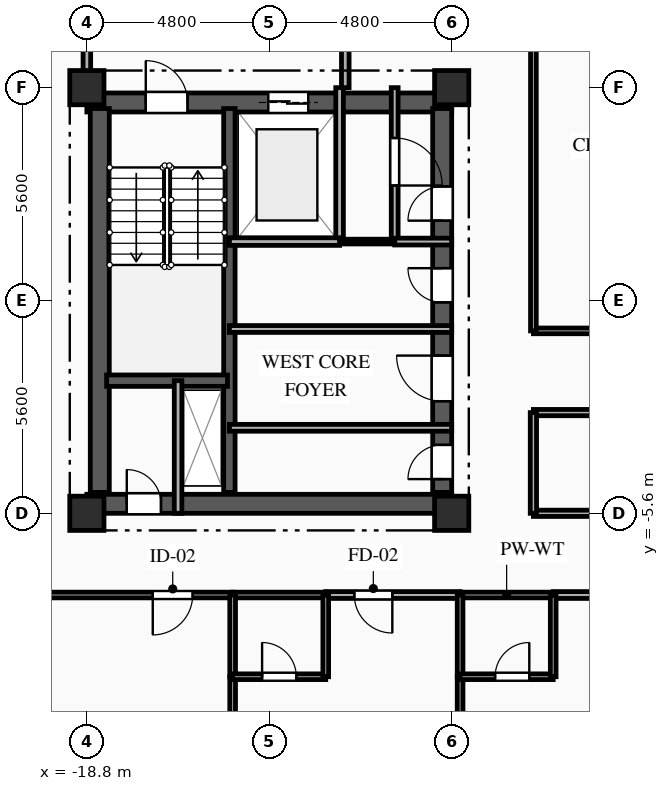
"""IFC4 building model, lengths in metres.
Left out: names, types, materials, properties, quantities, classifications, styles, units other than length and angle.
Written with IfcOpenShell. Run it as: python <this file> out.ifc"""

import sys

from ifc_helpers import new_model, si_unit, direction, frame, frame_2d, origin, origin_2d, place, context, subcontext, project, spatial, rectangle, extrude, element, fill, save


model = new_model("IFC4")
c1 = context("Model", 3, precision=1e-05, world=origin(), true_north=direction((0.0, 1.0)))
c2 = subcontext(c1, "Body", "Model", "MODEL_VIEW")
j1 = project(units=[si_unit("LENGTHUNIT", "METRE"), si_unit("PLANEANGLEUNIT", "RADIAN")], contexts=[c1])
p1 = place(None, origin())
s1 = spatial("IfcSite", under=j1, at=p1, CompositionType="ELEMENT")
p2 = place(p1, origin())
s2 = spatial("IfcBuilding", under=s1, at=p2, CompositionType="ELEMENT")
p3 = place(p2, frame((0.0, 0.0, 151.1)))
s3 = spatial("IfcBuildingStorey", under=s2, at=p3, CompositionType="ELEMENT", Elevation=151.1)
for number, where, z_axis, x_axis in (
    (1, (-18.8, -5.6, 0.0), (0.0, 0.0, 1.0), (1.0, 0.0, 0.0)),
    (2, (-18.8, 5.6, 0.0), (0.0, 0.0, 1.0), (1.0, 0.0, 0.0)),
    (3, (-9.2, -5.6, 0.0), (0.0, 0.0, 1.0), (1.0, 0.0, 0.0)),
    (4, (-9.2, 5.6, 0.0), (0.0, 0.0, 1.0), (1.0, 0.0, 0.0)),
):
    element("IfcColumn", number, at=place(p3, frame(where, z_axis=z_axis, x_axis=x_axis)), inside=s3, PredefinedType="COLUMN", context=c2, shape_type="SweptSolid", body=[
        extrude(rectangle(XDim=0.9, YDim=0.9, at=origin_2d()), origin(), (0.0, 0.0, 1.0), 3.35),
    ])
p4 = place(p3, frame((-18.8, 5.21, 0.0), z_axis=(0.0, 0.0, 1.0), x_axis=(1.0, 0.0, 0.0)))
e5 = element("IfcWall", 5, at=p4, inside=s3, PredefinedType="SHEAR", context=c2, shape_type="SweptSolid", body=[
    extrude(rectangle(XDim=9.6, YDim=0.5, at=frame_2d((4.8, 0.0))), origin(), (0.0, 0.0, 1.0), 3.04),
])
p5 = place(p4, frame((1.55, 0.0, 0.0)))
e6 = element("IfcOpeningElement", 6, at=p5, cuts=e5, PredefinedType="OPENING", context=c2, shape_type="SweptSolid", body=[
    extrude(rectangle(XDim=1.1, YDim=2.15, at=frame_2d((0.55, 1.075))), frame((0.0, 0.26, 0.0), z_axis=(0.0, -1.0, 0.0), x_axis=(1.0, 0.0, 0.0)), (0.0, 0.0, 1.0), 0.52),
])
p6 = place(p4, frame((4.775, 0.0, 0.0)))
e7 = element("IfcOpeningElement", 7, at=p6, cuts=e5, PredefinedType="OPENING", context=c2, shape_type="SweptSolid", body=[
    extrude(rectangle(XDim=1.05, YDim=2.1, at=frame_2d((0.525, 1.05))), frame((0.0, 0.26, 0.0), z_axis=(0.0, -1.0, 0.0), x_axis=(1.0, 0.0, 0.0)), (0.0, 0.0, 1.0), 0.52),
])
p7 = place(p3, frame((-18.8, -5.35, 0.0), z_axis=(0.0, 0.0, 1.0), x_axis=(1.0, 0.0, 0.0)))
e8 = element("IfcWall", 8, at=p7, inside=s3, PredefinedType="SHEAR", context=c2, shape_type="SweptSolid", body=[
    extrude(rectangle(XDim=9.6, YDim=0.5, at=frame_2d((4.8, 0.0))), origin(), (0.0, 0.0, 1.0), 3.04),
])
p8 = place(p7, frame((1.05, 0.0, 0.0)))
e9 = element("IfcOpeningElement", 9, at=p8, cuts=e8, PredefinedType="OPENING", context=c2, shape_type="SweptSolid", body=[
    extrude(rectangle(XDim=0.9, YDim=2.1, at=frame_2d((0.45, 1.05))), frame((0.0, 0.26, 0.0), z_axis=(0.0, -1.0, 0.0), x_axis=(1.0, 0.0, 0.0)), (0.0, 0.0, 1.0), 0.52),
])
p9 = place(p3, frame((-18.46, -5.05, 0.0), z_axis=(0.0, 0.0, 1.0), x_axis=(0.0, 1.0, 0.0)))
e10 = element("IfcWall", 10, at=p9, inside=s3, PredefinedType="SHEAR", context=c2, shape_type="SweptSolid", body=[
    extrude(rectangle(XDim=10.1, YDim=0.5, at=frame_2d((5.05, 0.0))), origin(), (0.0, 0.0, 1.0), 3.04),
])
p10 = place(p3, frame((-9.45, -5.05, 0.0), z_axis=(0.0, 0.0, 1.0), x_axis=(0.0, 1.0, 0.0)))
e11 = element("IfcWall", 11, at=p10, inside=s3, PredefinedType="SHEAR", context=c2, shape_type="SweptSolid", body=[
    extrude(rectangle(XDim=10.1, YDim=0.5, at=frame_2d((5.05, 0.0))), origin(), (0.0, 0.0, 1.0), 3.04),
])
p11 = place(p10, frame((7.15, 0.0, 0.0)))
e12 = element("IfcOpeningElement", 12, at=p11, cuts=e11, PredefinedType="OPENING", context=c2, shape_type="SweptSolid", body=[
    extrude(rectangle(XDim=0.9, YDim=2.1, at=frame_2d((0.45, 1.05))), frame((0.0, 0.26, 0.0), z_axis=(0.0, -1.0, 0.0), x_axis=(1.0, 0.0, 0.0)), (0.0, 0.0, 1.0), 0.52),
])
p12 = place(p10, frame((2.4, 0.0, 0.0)))
e13 = element("IfcOpeningElement", 13, at=p12, cuts=e11, PredefinedType="OPENING", context=c2, shape_type="SweptSolid", body=[
    extrude(rectangle(XDim=1.2, YDim=2.15, at=frame_2d((0.6, 1.075))), frame((0.0, 0.26, 0.0), z_axis=(0.0, -1.0, 0.0), x_axis=(1.0, 0.0, 0.0)), (0.0, 0.0, 1.0), 0.52),
])
p13 = place(p10, frame((0.35, 0.0, 0.0)))
e14 = element("IfcOpeningElement", 14, at=p13, cuts=e11, PredefinedType="OPENING", context=c2, shape_type="SweptSolid", body=[
    extrude(rectangle(XDim=0.9, YDim=2.1, at=frame_2d((0.45, 1.05))), frame((0.0, 0.26, 0.0), z_axis=(0.0, -1.0, 0.0), x_axis=(1.0, 0.0, 0.0)), (0.0, 0.0, 1.0), 0.52),
])
p14 = place(p10, frame((5.0, 0.0, 0.0)))
e15 = element("IfcOpeningElement", 15, at=p14, cuts=e11, PredefinedType="OPENING", context=c2, shape_type="SweptSolid", body=[
    extrude(rectangle(XDim=0.9, YDim=2.1, at=frame_2d((0.45, 1.05))), frame((0.0, 0.26, 0.0), z_axis=(0.0, -1.0, 0.0), x_axis=(1.0, 0.0, 0.0)), (0.0, 0.0, 1.0), 0.52),
])
p15 = place(p3, frame((-15.05, -5.05, 0.0), z_axis=(0.0, 0.0, 1.0), x_axis=(0.0, 1.0, 0.0)))
e16 = element("IfcWall", 16, at=p15, inside=s3, PredefinedType="SHEAR", context=c2, shape_type="SweptSolid", body=[
    extrude(rectangle(XDim=10.1, YDim=0.3, at=frame_2d((5.05, 0.0))), origin(), (0.0, 0.0, 1.0), 3.04),
])
p16 = place(p3, frame((-18.28, -2.11, 0.0), z_axis=(0.0, 0.0, 1.0), x_axis=(1.0, 0.0, 0.0)))
e17 = element("IfcWall", 17, at=p16, inside=s3, PredefinedType="SHEAR", context=c2, shape_type="SweptSolid", body=[
    extrude(rectangle(XDim=3.18, YDim=0.3, at=frame_2d((1.59, 0.0))), origin(), (0.0, 0.0, 1.0), 3.04),
])
p17 = place(p3, frame((-16.4, -5.6, 0.0), z_axis=(0.0, 0.0, 1.0), x_axis=(0.0, 1.0, 0.0)))
e18 = element("IfcWall", 18, at=p17, inside=s3, PredefinedType="PARTITIONING", context=c2, shape_type="SweptSolid", body=[
    extrude(rectangle(XDim=3.49, YDim=0.2, at=frame_2d((1.745, 0.0))), origin(), (0.0, 0.0, 1.0), 3.04),
])
p18 = place(p3, frame((-12.15, 1.55, 0.0), z_axis=(0.0, 0.0, 1.0), x_axis=(0.0, 1.0, 0.0)))
e19 = element("IfcWall", 19, at=p18, inside=s3, PredefinedType="PARTITIONING", context=c2, shape_type="SweptSolid", body=[
    extrude(rectangle(XDim=4.05, YDim=0.2, at=frame_2d((2.025, 0.0))), origin(), (0.0, 0.0, 1.0), 3.04),
])
p19 = place(p3, frame((-18.8, 8.5, 0.0), z_axis=(0.0, 0.0, 1.0), x_axis=(0.0, -1.0, 0.0)))
e20 = element("IfcWall", 20, at=p19, inside=s3, PredefinedType="PARTITIONING", context=c2, shape_type="SweptSolid", body=[
    extrude(rectangle(XDim=2.9, YDim=0.2, at=frame_2d((1.45, 0.0))), origin(), (0.0, 0.0, 1.0), 2.525),
])
p20 = place(p3, frame((-12.0, 5.6, 0.0), z_axis=(0.0, 0.0, 1.0), x_axis=(0.0, 1.0, 0.0)))
e21 = element("IfcWall", 21, at=p20, inside=s3, PredefinedType="PARTITIONING", context=c2, shape_type="SweptSolid", body=[
    extrude(rectangle(XDim=2.9, YDim=0.2, at=frame_2d((1.45, 0.0))), origin(), (0.0, 0.0, 1.0), 3.04),
])
p21 = place(p3, frame((-10.7, 5.6, 0.0), z_axis=(0.0, 0.0, 1.0), x_axis=(0.0, -1.0, 0.0)))
e22 = element("IfcWall", 22, at=p21, inside=s3, PredefinedType="PARTITIONING", context=c2, shape_type="SweptSolid", body=[
    extrude(rectangle(XDim=4.05, YDim=0.18, at=frame_2d((2.025, 0.0))), origin(), (0.0, 0.0, 1.0), 3.04),
])
p22 = place(p21, frame((1.325, 0.0, 0.0)))
e23 = element("IfcOpeningElement", 23, at=p22, cuts=e22, PredefinedType="OPENING", context=c2, shape_type="SweptSolid", body=[
    extrude(rectangle(XDim=1.25, YDim=2.2, at=frame_2d((0.625, 1.1))), frame((0.0, 0.1, 0.0), z_axis=(0.0, -1.0, 0.0), x_axis=(1.0, 0.0, 0.0)), (0.0, 0.0, 1.0), 0.2),
])
p23 = place(p3, frame((-10.7, 1.55, 0.0), z_axis=(0.0, 0.0, 1.0), x_axis=(1.0, 0.0, 0.0)))
e24 = element("IfcWall", 24, at=p23, inside=s3, PredefinedType="PARTITIONING", context=c2, shape_type="SweptSolid", body=[
    extrude(rectangle(XDim=1.5, YDim=0.18, at=frame_2d((0.75, 0.0))), origin(), (0.0, 0.0, 1.0), 3.04),
])
p24 = place(p3, frame((-12.15, 1.55, 0.0), z_axis=(0.0, 0.0, 1.0), x_axis=(1.0, 0.0, 0.0)))
e25 = element("IfcWall", 25, at=p24, inside=s3, PredefinedType="PARTITIONING", context=c2, shape_type="SweptSolid", body=[
    extrude(rectangle(XDim=1.45, YDim=0.125, at=frame_2d((0.725, 0.0))), origin(), (0.0, 0.0, 1.0), 3.04),
])
p25 = place(p3, frame((-15.05, -3.35, 0.0), z_axis=(0.0, 0.0, 1.0), x_axis=(1.0, 0.0, 0.0)))
e26 = element("IfcWall", 26, at=p25, inside=s3, PredefinedType="PARTITIONING", context=c2, shape_type="SweptSolid", body=[
    extrude(rectangle(XDim=5.85, YDim=0.18, at=frame_2d((2.925, 0.0))), origin(), (0.0, 0.0, 1.0), 2.755),
])
p26 = place(p3, frame((-9.2, -0.75, 0.0), z_axis=(0.0, 0.0, 1.0), x_axis=(-1.0, 0.0, 0.0)))
e27 = element("IfcWall", 27, at=p26, inside=s3, PredefinedType="PARTITIONING", context=c2, shape_type="SweptSolid", body=[
    extrude(rectangle(XDim=5.85, YDim=0.18, at=frame_2d((2.925, 0.0))), origin(), (0.0, 0.0, 1.0), 3.04),
])
p27 = place(p3, frame((-14.964, -7.75, 0.0), z_axis=(0.0, 0.0, 1.0), x_axis=(-1.0, 0.0, 0.0)))
e28 = element("IfcWall", 28, at=p27, inside=s3, PredefinedType="PARTITIONING", context=c2, shape_type="SweptSolid", body=[
    extrude(rectangle(XDim=5.986, YDim=0.15, at=frame_2d((2.993, 0.0))), origin(), (0.0, 0.0, 1.0), 3.04),
])
p28 = place(p27, frame((1.052, 0.0, 0.0)))
e29 = element("IfcOpeningElement", 29, at=p28, cuts=e28, PredefinedType="OPENING", context=c2, shape_type="SweptSolid", body=[
    extrude(rectangle(XDim=1.05, YDim=2.15, at=frame_2d((0.525, 1.075))), frame((0.0, 0.085, 0.0), z_axis=(0.0, -1.0, 0.0), x_axis=(1.0, 0.0, 0.0)), (0.0, 0.0, 1.0), 0.17),
])
p29 = place(p3, frame((-8.979, -7.75, 0.0), z_axis=(0.0, 0.0, 1.0), x_axis=(-1.0, 0.0, 0.0)))
e30 = element("IfcWall", 30, at=p29, inside=s3, PredefinedType="PARTITIONING", context=c2, shape_type="SweptSolid", body=[
    extrude(rectangle(XDim=3.535, YDim=0.18, at=frame_2d((1.768, 0.0))), origin(), (0.0, 0.0, 1.0), 3.04),
])
p30 = place(p29, frame((1.783, 0.0, 0.0)))
e31 = element("IfcOpeningElement", 31, at=p30, cuts=e30, PredefinedType="OPENING", context=c2, shape_type="SweptSolid", body=[
    extrude(rectangle(XDim=1.0, YDim=2.15, at=frame_2d((0.5, 1.075))), frame((0.0, 0.1, 0.0), z_axis=(0.0, -1.0, 0.0), x_axis=(1.0, 0.0, 0.0)), (0.0, 0.0, 1.0), 0.2),
])
p31 = place(p3, frame((-12.514, -7.75, 0.0), z_axis=(0.0, 0.0, 1.0), x_axis=(-1.0, 0.0, 0.0)))
e32 = element("IfcWall", 32, at=p31, inside=s3, PredefinedType="PLUMBINGWALL", context=c2, shape_type="SweptSolid", body=[
    extrude(rectangle(XDim=2.45, YDim=0.15, at=frame_2d((1.225, 0.0))), origin(), (0.0, 0.0, 1.0), 3.04),
])
p32 = place(p3, frame((-2.993, -7.75, 0.0), z_axis=(0.0, 0.0, 1.0), x_axis=(-1.0, 0.0, 0.0)))
e33 = element("IfcWall", 33, at=p32, inside=s3, PredefinedType="PARTITIONING", context=c2, shape_type="SweptSolid", body=[
    extrude(rectangle(XDim=3.536, YDim=0.18, at=frame_2d((1.768, 0.0))), origin(), (0.0, 0.0, 1.0), 3.04),
])
p33 = place(p32, frame((0.752, 0.0, 0.0)))
e34 = element("IfcOpeningElement", 34, at=p33, cuts=e33, PredefinedType="OPENING", context=c2, shape_type="SweptSolid", body=[
    extrude(rectangle(XDim=1.0, YDim=2.15, at=frame_2d((0.5, 1.075))), frame((0.0, 0.1, 0.0), z_axis=(0.0, -1.0, 0.0), x_axis=(1.0, 0.0, 0.0)), (0.0, 0.0, 1.0), 0.2),
])
p34 = place(p3, frame((-6.529, -7.75, 0.0), z_axis=(0.0, 0.0, 1.0), x_axis=(-1.0, 0.0, 0.0)))
e35 = element("IfcWall", 35, at=p34, inside=s3, PredefinedType="PLUMBINGWALL", context=c2, shape_type="SweptSolid", body=[
    extrude(rectangle(XDim=2.45, YDim=0.15, at=frame_2d((1.225, 0.0))), origin(), (0.0, 0.0, 1.0), 3.04),
])
p35 = place(p3, frame((-7.05, -5.6, 0.0), z_axis=(0.0, 0.0, 1.0), x_axis=(1.0, 0.0, 0.0)))
e36 = element("IfcWall", 36, at=p35, inside=s3, PredefinedType="PARTITIONING", context=c2, shape_type="SweptSolid", body=[
    extrude(rectangle(XDim=7.05, YDim=0.165, at=frame_2d((3.525, 0.0))), origin(), (0.0, 0.0, 1.0), 2.525),
])
p36 = place(p3, frame((-7.05, -0.8, 0.0), z_axis=(0.0, 0.0, 1.0), x_axis=(1.0, 0.0, 0.0)))
e37 = element("IfcWall", 37, at=p36, inside=s3, PredefinedType="PARTITIONING", context=c2, shape_type="SweptSolid", body=[
    extrude(rectangle(XDim=14.1, YDim=0.15, at=frame_2d((7.05, 0.0))), origin(), (0.0, 0.0, 1.0), 3.04),
])
p37 = place(p36, frame((6.525, 0.0, 0.0)))
e38 = element("IfcOpeningElement", 38, at=p37, cuts=e37, PredefinedType="OPENING", context=c2, shape_type="SweptSolid", body=[
    extrude(rectangle(XDim=1.05, YDim=2.15, at=frame_2d((0.525, 1.075))), frame((0.0, 0.085, 0.0), z_axis=(0.0, -1.0, 0.0), x_axis=(1.0, 0.0, 0.0)), (0.0, 0.0, 1.0), 0.17),
])
p38 = place(p3, frame((7.05, -2.95, 0.0), z_axis=(0.0, 0.0, 1.0), x_axis=(-1.0, 0.0, 0.0)))
e39 = element("IfcWall", 39, at=p38, inside=s3, PredefinedType="PARTITIONING", context=c2, shape_type="SweptSolid", body=[
    extrude(rectangle(XDim=14.1, YDim=0.165, at=frame_2d((7.05, 0.0))), origin(), (0.0, 0.0, 1.0), 3.04),
])
p39 = place(p38, frame((6.475, 0.0, 0.0)))
e40 = element("IfcOpeningElement", 40, at=p39, cuts=e39, PredefinedType="OPENING", context=c2, shape_type="SweptSolid", body=[
    extrude(rectangle(XDim=1.15, YDim=2.15, at=frame_2d((0.575, 1.075))), frame((0.0, 0.093, 0.0), z_axis=(0.0, -1.0, 0.0), x_axis=(1.0, 0.0, 0.0)), (0.0, 0.0, 1.0), 0.185),
])
p40 = place(p3, frame((-7.05, 8.5, 0.0), z_axis=(0.0, 0.0, 1.0), x_axis=(0.0, -1.0, 0.0)))
e41 = element("IfcWall", 41, at=p40, inside=s3, PredefinedType="PARTITIONING", context=c2, shape_type="SweptSolid", body=[
    extrude(rectangle(XDim=9.3, YDim=0.15, at=frame_2d((4.65, 0.0))), origin(), (0.0, 0.0, 1.0), 3.04),
])
p41 = place(p3, frame((-7.05, -2.95, 0.0), z_axis=(0.0, 0.0, 1.0), x_axis=(0.0, -1.0, 0.0)))
e42 = element("IfcWall", 42, at=p41, inside=s3, PredefinedType="PARTITIONING", context=c2, shape_type="SweptSolid", body=[
    extrude(rectangle(XDim=2.65, YDim=0.165, at=frame_2d((1.325, 0.0))), origin(), (0.0, 0.0, 1.0), 3.04),
])
p42 = place(p3, frame((-14.964, -9.9, 0.0), z_axis=(0.0, 0.0, 1.0), x_axis=(0.0, -1.0, 0.0)))
e43 = element("IfcWall", 43, at=p42, inside=s3, PredefinedType="PARTITIONING", context=c2, shape_type="SweptSolid", body=[
    extrude(rectangle(XDim=5.7, YDim=0.15, at=frame_2d((2.85, 0.0))), origin(), (0.0, 0.0, 1.0), 3.04),
])
p43 = place(p3, frame((-14.964, -7.75, 0.0), z_axis=(0.0, 0.0, 1.0), x_axis=(0.0, -1.0, 0.0)))
e44 = element("IfcWall", 44, at=p43, inside=s3, PredefinedType="PLUMBINGWALL", context=c2, shape_type="SweptSolid", body=[
    extrude(rectangle(XDim=2.15, YDim=0.15, at=frame_2d((1.075, 0.0))), origin(), (0.0, 0.0, 1.0), 3.04),
])
p44 = place(p3, frame((-14.964, -9.9, 0.0), z_axis=(0.0, 0.0, 1.0), x_axis=(1.0, 0.0, 0.0)))
e45 = element("IfcWall", 45, at=p44, inside=s3, PredefinedType="PLUMBINGWALL", context=c2, shape_type="SweptSolid", body=[
    extrude(rectangle(XDim=2.45, YDim=0.15, at=frame_2d((1.225, 0.0))), origin(), (0.0, 0.0, 1.0), 3.04),
])
p45 = place(p44, frame((0.775, 0.0, 0.0)))
e46 = element("IfcOpeningElement", 46, at=p45, cuts=e45, PredefinedType="OPENING", context=c2, shape_type="SweptSolid", body=[
    extrude(rectangle(XDim=0.9, YDim=2.1, at=frame_2d((0.45, 1.05))), frame((0.0, 0.085, 0.0), z_axis=(0.0, -1.0, 0.0), x_axis=(1.0, 0.0, 0.0)), (0.0, 0.0, 1.0), 0.17),
])
p46 = place(p3, frame((-12.514, -9.9, 0.0), z_axis=(0.0, 0.0, 1.0), x_axis=(0.0, 1.0, 0.0)))
e47 = element("IfcWall", 47, at=p46, inside=s3, PredefinedType="PLUMBINGWALL", context=c2, shape_type="SweptSolid", body=[
    extrude(rectangle(XDim=2.15, YDim=0.15, at=frame_2d((1.075, 0.0))), origin(), (0.0, 0.0, 1.0), 3.04),
])
p47 = place(p3, frame((-8.979, -9.9, 0.0), z_axis=(0.0, 0.0, 1.0), x_axis=(0.0, -1.0, 0.0)))
e48 = element("IfcWall", 48, at=p47, inside=s3, PredefinedType="PARTITIONING", context=c2, shape_type="SweptSolid", body=[
    extrude(rectangle(XDim=5.7, YDim=0.15, at=frame_2d((2.85, 0.0))), origin(), (0.0, 0.0, 1.0), 2.525),
])
p48 = place(p3, frame((-8.979, -7.75, 0.0), z_axis=(0.0, 0.0, 1.0), x_axis=(0.0, -1.0, 0.0)))
e49 = element("IfcWall", 49, at=p48, inside=s3, PredefinedType="PLUMBINGWALL", context=c2, shape_type="SweptSolid", body=[
    extrude(rectangle(XDim=2.15, YDim=0.15, at=frame_2d((1.075, 0.0))), origin(), (0.0, 0.0, 1.0), 2.525),
])
p49 = place(p3, frame((-8.979, -9.9, 0.0), z_axis=(0.0, 0.0, 1.0), x_axis=(1.0, 0.0, 0.0)))
e50 = element("IfcWall", 50, at=p49, inside=s3, PredefinedType="PLUMBINGWALL", context=c2, shape_type="SweptSolid", body=[
    extrude(rectangle(XDim=2.45, YDim=0.15, at=frame_2d((1.225, 0.0))), origin(), (0.0, 0.0, 1.0), 3.04),
])
p50 = place(p49, frame((0.921, 0.0, 0.0)))
e51 = element("IfcOpeningElement", 51, at=p50, cuts=e50, PredefinedType="OPENING", context=c2, shape_type="SweptSolid", body=[
    extrude(rectangle(XDim=0.9, YDim=2.1, at=frame_2d((0.45, 1.05))), frame((0.0, 0.085, 0.0), z_axis=(0.0, -1.0, 0.0), x_axis=(1.0, 0.0, 0.0)), (0.0, 0.0, 1.0), 0.17),
])
p51 = place(p3, frame((-6.529, -9.9, 0.0), z_axis=(0.0, 0.0, 1.0), x_axis=(0.0, 1.0, 0.0)))
e52 = element("IfcWall", 52, at=p51, inside=s3, PredefinedType="PLUMBINGWALL", context=c2, shape_type="SweptSolid", body=[
    extrude(rectangle(XDim=2.15, YDim=0.15, at=frame_2d((1.075, 0.0))), origin(), (0.0, 0.0, 1.0), 3.04),
])
p52 = place(p3, frame((-15.05, 1.55, 0.0), z_axis=(0.0, 0.0, 1.0), x_axis=(1.0, 0.0, 0.0)))
e53 = element("IfcWall", 53, at=p52, inside=s3, PredefinedType="PARTITIONING", context=c2, shape_type="SweptSolid", body=[
    extrude(rectangle(XDim=2.9, YDim=0.2, at=frame_2d((1.45, 0.0))), origin(), (0.0, 0.0, 1.0), 3.04),
])
p53 = place(p5, origin())
e54 = element("IfcDoor", 54, at=p53, inside=s3, OperationType="SINGLE_SWING_LEFT", PredefinedType="DOOR", context=c2, shape_type="SweptSolid", body=[
    extrude(rectangle(XDim=1.1, YDim=2.15, at=frame_2d((0.55, 1.075))), frame((0.0, 0.025, 0.0), z_axis=(0.0, -1.0, 0.0), x_axis=(1.0, 0.0, 0.0)), (0.0, 0.0, 1.0), 0.05),
])
fill(e6, e54)
p54 = place(p6, origin())
e55 = element("IfcDoor", 55, at=p54, inside=s3, OperationType="DOUBLE_DOOR_SLIDING", PredefinedType="DOOR", context=c2, shape_type="SweptSolid", body=[
    extrude(rectangle(XDim=1.05, YDim=2.1, at=frame_2d((0.525, 1.05))), frame((0.0, 0.025, 0.0), z_axis=(0.0, -1.0, 0.0), x_axis=(1.0, 0.0, 0.0)), (0.0, 0.0, 1.0), 0.05),
])
fill(e7, e55)
p55 = place(p8, origin())
e56 = element("IfcDoor", 56, at=p55, inside=s3, OperationType="SINGLE_SWING_LEFT", PredefinedType="DOOR", context=c2, shape_type="SweptSolid", body=[
    extrude(rectangle(XDim=0.9, YDim=2.1, at=frame_2d((0.45, 1.05))), frame((0.0, 0.025, 0.0), z_axis=(0.0, -1.0, 0.0), x_axis=(1.0, 0.0, 0.0)), (0.0, 0.0, 1.0), 0.05),
])
fill(e9, e56)
p56 = place(p22, origin())
e57 = element("IfcDoor", 57, at=p56, inside=s3, OperationType="SINGLE_SWING_RIGHT", PredefinedType="DOOR", context=c2, shape_type="SweptSolid", body=[
    extrude(rectangle(XDim=1.25, YDim=2.2, at=frame_2d((0.625, 1.1))), frame((0.0, 0.025, 0.0), z_axis=(0.0, -1.0, 0.0), x_axis=(1.0, 0.0, 0.0)), (0.0, 0.0, 1.0), 0.05),
])
fill(e23, e57)
p57 = place(p11, origin())
e58 = element("IfcDoor", 58, at=p57, inside=s3, OperationType="SINGLE_SWING_LEFT", PredefinedType="DOOR", context=c2, shape_type="SweptSolid", body=[
    extrude(rectangle(XDim=0.9, YDim=2.1, at=frame_2d((0.45, 1.05))), frame((0.0, 0.025, 0.0), z_axis=(0.0, -1.0, 0.0), x_axis=(1.0, 0.0, 0.0)), (0.0, 0.0, 1.0), 0.05),
])
fill(e12, e58)
p58 = place(p12, origin())
e59 = element("IfcDoor", 59, at=p58, inside=s3, OperationType="SINGLE_SWING_RIGHT", PredefinedType="DOOR", context=c2, shape_type="SweptSolid", body=[
    extrude(rectangle(XDim=1.2, YDim=2.15, at=frame_2d((0.6, 1.075))), frame((0.0, 0.025, 0.0), z_axis=(0.0, -1.0, 0.0), x_axis=(1.0, 0.0, 0.0)), (0.0, 0.0, 1.0), 0.05),
])
fill(e13, e59)
p59 = place(p13, origin())
e60 = element("IfcDoor", 60, at=p59, inside=s3, OperationType="SINGLE_SWING_LEFT", PredefinedType="DOOR", context=c2, shape_type="SweptSolid", body=[
    extrude(rectangle(XDim=0.9, YDim=2.1, at=frame_2d((0.45, 1.05))), frame((0.0, 0.025, 0.0), z_axis=(0.0, -1.0, 0.0), x_axis=(1.0, 0.0, 0.0)), (0.0, 0.0, 1.0), 0.05),
])
fill(e14, e60)
p60 = place(p14, origin())
e61 = element("IfcDoor", 61, at=p60, inside=s3, OperationType="SINGLE_SWING_RIGHT", PredefinedType="DOOR", context=c2, shape_type="SweptSolid", body=[
    extrude(rectangle(XDim=0.9, YDim=2.1, at=frame_2d((0.45, 1.05))), frame((0.0, 0.025, 0.0), z_axis=(0.0, -1.0, 0.0), x_axis=(1.0, 0.0, 0.0)), (0.0, 0.0, 1.0), 0.05),
])
fill(e15, e61)
p61 = place(p28, origin())
e62 = element("IfcDoor", 62, at=p61, inside=s3, OperationType="SINGLE_SWING_RIGHT", PredefinedType="DOOR", context=c2, shape_type="SweptSolid", body=[
    extrude(rectangle(XDim=1.05, YDim=2.15, at=frame_2d((0.525, 1.075))), frame((0.0, 0.025, 0.0), z_axis=(0.0, -1.0, 0.0), x_axis=(1.0, 0.0, 0.0)), (0.0, 0.0, 1.0), 0.05),
])
fill(e29, e62)
p62 = place(p30, origin())
e63 = element("IfcDoor", 63, at=p62, inside=s3, OperationType="SINGLE_SWING_LEFT", PredefinedType="DOOR", context=c2, shape_type="SweptSolid", body=[
    extrude(rectangle(XDim=1.0, YDim=2.15, at=frame_2d((0.5, 1.075))), frame((0.0, 0.025, 0.0), z_axis=(0.0, -1.0, 0.0), x_axis=(1.0, 0.0, 0.0)), (0.0, 0.0, 1.0), 0.05),
])
fill(e31, e63)
p63 = place(p45, origin())
e64 = element("IfcDoor", 64, at=p63, inside=s3, OperationType="SINGLE_SWING_LEFT", PredefinedType="DOOR", context=c2, shape_type="SweptSolid", body=[
    extrude(rectangle(XDim=0.9, YDim=2.1, at=frame_2d((0.45, 1.05))), frame((0.0, 0.025, 0.0), z_axis=(0.0, -1.0, 0.0), x_axis=(1.0, 0.0, 0.0)), (0.0, 0.0, 1.0), 0.05),
])
fill(e46, e64)
p64 = place(p50, origin())
e65 = element("IfcDoor", 65, at=p64, inside=s3, OperationType="SINGLE_SWING_RIGHT", PredefinedType="DOOR", context=c2, shape_type="SweptSolid", body=[
    extrude(rectangle(XDim=0.9, YDim=2.1, at=frame_2d((0.45, 1.05))), frame((0.0, 0.025, 0.0), z_axis=(0.0, -1.0, 0.0), x_axis=(1.0, 0.0, 0.0)), (0.0, 0.0, 1.0), 0.05),
])
fill(e51, e65)
save(model, sys.argv[1])
